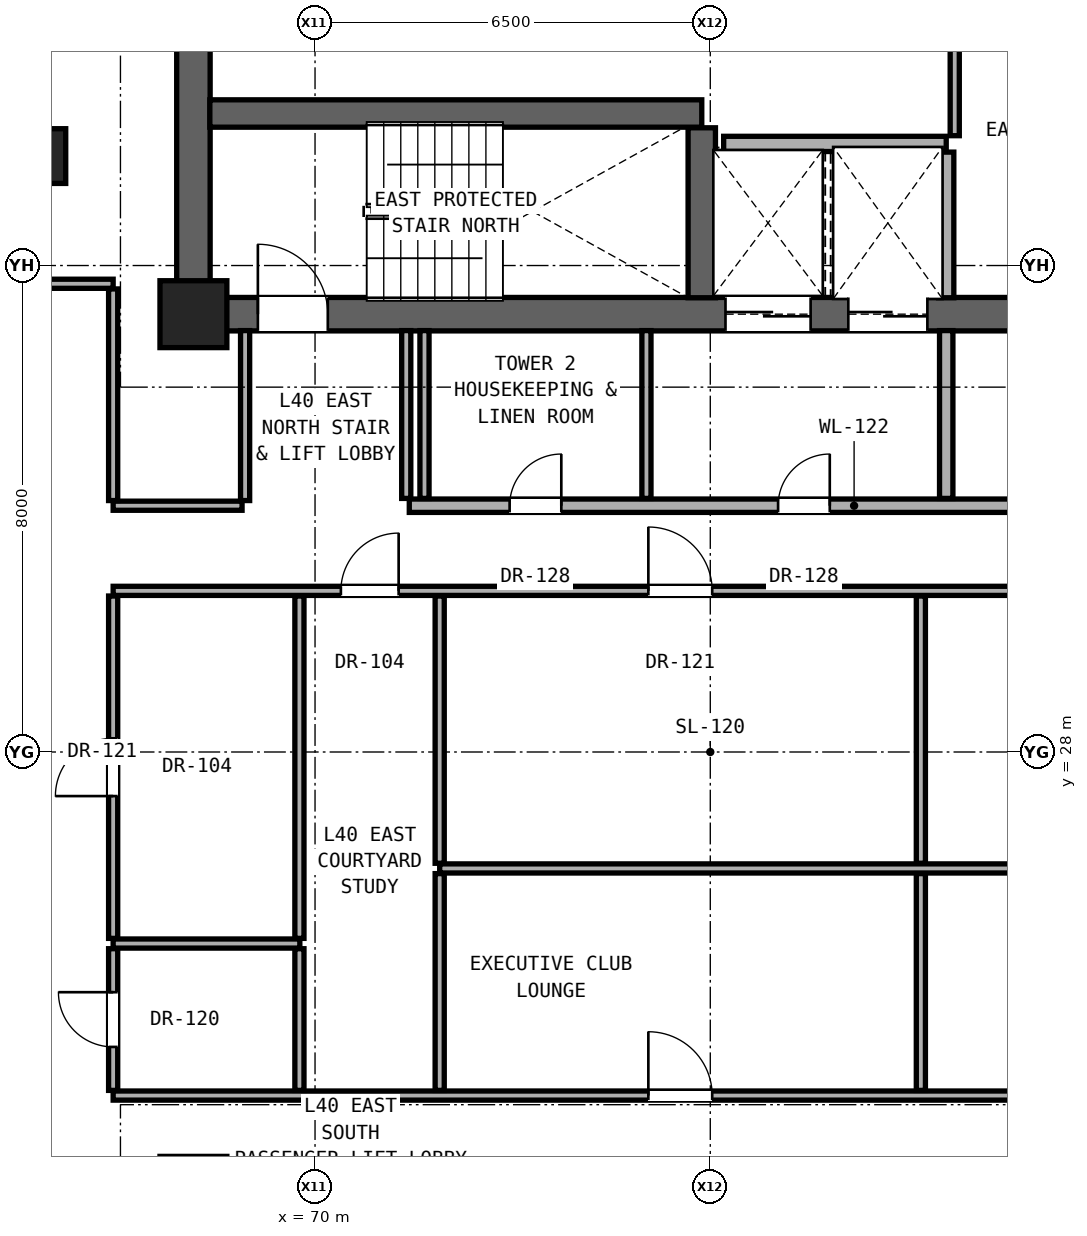
"""IFC4 building model, lengths in metres.
Left out: names, types, materials, properties, quantities, classifications, styles, units other than length and angle.
Written with IfcOpenShell. Run it as: python <this file> out.ifc"""

import sys

from ifc_helpers import new_model, si_unit, direction, frame, frame_2d, origin, origin_2d, place, context, subcontext, project, spatial, rectangle, extrude, element, fill, save


model = new_model("IFC4")
c1 = context("Model", 3, precision=1e-05, world=origin(), true_north=direction((0.0, 1.0)))
c2 = subcontext(c1, "Body", "Model", "MODEL_VIEW")
j1 = project(units=[si_unit("LENGTHUNIT", "METRE"), si_unit("PLANEANGLEUNIT", "RADIAN")], contexts=[c1])
p1 = place(None, origin())
s1 = spatial("IfcSite", under=j1, at=p1, CompositionType="ELEMENT")
p2 = place(p1, origin())
s2 = spatial("IfcBuilding", under=s1, at=p2, CompositionType="ELEMENT")
p3 = place(p2, frame((0.0, 0.0, 141.2)))
s3 = spatial("IfcBuildingStorey", under=s2, at=p3, CompositionType="ELEMENT", Elevation=141.2)
p4 = place(p3, frame((68.0, 35.2, 0.0), z_axis=(0.0, 0.0, 1.0), x_axis=(1.0, 0.0, 0.0)))
e1 = element("IfcColumn", 1, at=p4, inside=s3, PredefinedType="COLUMN", context=c2, shape_type="SweptSolid", body=[
    extrude(rectangle(XDim=1.1, YDim=1.1, at=origin_2d()), origin(), (0.0, 0.0, 1.0), 3.3),
])
p5 = place(p3, frame((65.6, 37.8, 0.0), z_axis=(0.0, 0.0, 1.0), x_axis=(1.0, 0.0, 0.0)))
e2 = element("IfcColumn", 2, at=p5, inside=s3, PredefinedType="PILASTER", context=c2, shape_type="SweptSolid", body=[
    extrude(rectangle(XDim=0.6, YDim=0.9, at=origin_2d()), origin(), (0.0, 0.0, 1.0), 3.3),
])
p6 = place(p3, frame((68.0, 35.2, 0.0), z_axis=(0.0, 0.0, 1.0), x_axis=(0.0, 1.0, 0.0)))
e3 = element("IfcWall", 3, at=p6, inside=s3, PredefinedType="SHEAR", context=c2, shape_type="SweptSolid", body=[
    extrude(rectangle(XDim=5.6, YDim=0.55, at=frame_2d((2.8, 0.0))), origin(), (0.0, 0.0, 1.0), 3.08),
])
p7 = place(p3, frame((68.0, 35.2, 0.0), z_axis=(0.0, 0.0, 1.0), x_axis=(1.0, 0.0, 0.0)))
e4 = element("IfcWall", 4, at=p7, inside=s3, PredefinedType="SHEAR", context=c2, shape_type="SweptSolid", body=[
    extrude(rectangle(XDim=17.0, YDim=0.55, at=frame_2d((8.5, 0.0))), origin(), (0.0, 0.0, 1.0), 3.08),
])
p8 = place(p7, frame((1.06, 0.0, 0.0)))
e5 = element("IfcOpeningElement", 5, at=p8, cuts=e4, PredefinedType="OPENING", context=c2, shape_type="SweptSolid", body=[
    extrude(rectangle(XDim=1.15, YDim=2.2, at=frame_2d((0.575, 1.1))), frame((0.0, 0.285, 0.0), z_axis=(0.0, -1.0, 0.0), x_axis=(1.0, 0.0, 0.0)), (0.0, 0.0, 1.0), 0.57),
])
p9 = place(p7, frame((8.75, 0.0, 0.0)))
e6 = element("IfcOpeningElement", 6, at=p9, cuts=e4, PredefinedType="OPENING", context=c2, shape_type="SweptSolid", body=[
    extrude(rectangle(XDim=1.4, YDim=2.35, at=frame_2d((0.7, 1.175))), frame((0.0, 0.285, 0.0), z_axis=(0.0, -1.0, 0.0), x_axis=(1.0, 0.0, 0.0)), (0.0, 0.0, 1.0), 0.57),
])
p10 = place(p7, frame((10.77, 0.0, 0.0)))
e7 = element("IfcOpeningElement", 7, at=p10, cuts=e4, PredefinedType="OPENING", context=c2, shape_type="SweptSolid", body=[
    extrude(rectangle(XDim=1.3, YDim=2.3, at=frame_2d((0.65, 1.15))), frame((0.0, 0.285, 0.0), z_axis=(0.0, -1.0, 0.0), x_axis=(1.0, 0.0, 0.0)), (0.0, 0.0, 1.0), 0.57),
])
p11 = place(p3, frame((66.68, 22.35, 0.0), z_axis=(0.0, 0.0, 1.0), x_axis=(1.0, 0.0, 0.0)))
e8 = element("IfcWall", 8, at=p11, inside=s3, PredefinedType="PARTITIONING", context=c2, shape_type="SweptSolid", body=[
    extrude(rectangle(XDim=19.5, YDim=0.15, at=frame_2d((9.75, 0.0))), origin(), (0.0, 0.0, 1.0), 2.216),
])
p12 = place(p11, frame((8.802, 0.0, 0.0)))
e9 = element("IfcOpeningElement", 9, at=p12, cuts=e8, PredefinedType="OPENING", context=c2, shape_type="SweptSolid", body=[
    extrude(rectangle(XDim=1.05, YDim=2.2, at=frame_2d((0.525, 1.1))), frame((0.0, 0.085, 0.0), z_axis=(0.0, -1.0, 0.0), x_axis=(1.0, 0.0, 0.0)), (0.0, 0.0, 1.0), 0.17),
])
p13 = place(p11, frame((15.846, 0.0, 0.0)))
e10 = element("IfcOpeningElement", 10, at=p13, cuts=e8, PredefinedType="OPENING", context=c2, shape_type="SweptSolid", body=[
    extrude(rectangle(XDim=1.05, YDim=2.2, at=frame_2d((0.525, 1.1))), frame((0.0, 0.085, 0.0), z_axis=(0.0, -1.0, 0.0), x_axis=(1.0, 0.0, 0.0)), (0.0, 0.0, 1.0), 0.17),
])
p14 = place(p3, frame((66.68, 24.85, 0.0), z_axis=(0.0, 0.0, 1.0), x_axis=(1.0, 0.0, 0.0)))
e11 = element("IfcWall", 11, at=p14, inside=s3, PredefinedType="PARTITIONING", context=c2, shape_type="SweptSolid", body=[
    extrude(rectangle(XDim=3.07, YDim=0.15, at=frame_2d((1.535, 0.0))), origin(), (0.0, 0.0, 1.0), 2.216),
])
p15 = place(p3, frame((72.05, 26.085, 0.0), z_axis=(0.0, 0.0, 1.0), x_axis=(1.0, 0.0, 0.0)))
e12 = element("IfcWall", 12, at=p15, inside=s3, PredefinedType="PARTITIONING", context=c2, shape_type="SweptSolid", body=[
    extrude(rectangle(XDim=14.13, YDim=0.15, at=frame_2d((7.065, 0.0))), origin(), (0.0, 0.0, 1.0), 2.216),
])
p16 = place(p3, frame((66.68, 30.65, 0.0), z_axis=(0.0, 0.0, 1.0), x_axis=(1.0, 0.0, 0.0)))
e13 = element("IfcWall", 13, at=p16, inside=s3, PredefinedType="PARTITIONING", context=c2, shape_type="SweptSolid", body=[
    extrude(rectangle(XDim=19.5, YDim=0.15, at=frame_2d((9.75, 0.0))), origin(), (0.0, 0.0, 1.0), 2.216),
])
p17 = place(p16, frame((3.745, 0.0, 0.0)))
e14 = element("IfcOpeningElement", 14, at=p17, cuts=e13, PredefinedType="OPENING", context=c2, shape_type="SweptSolid", body=[
    extrude(rectangle(XDim=0.95, YDim=2.15, at=frame_2d((0.475, 1.075))), frame((0.0, 0.085, 0.0), z_axis=(0.0, -1.0, 0.0), x_axis=(1.0, 0.0, 0.0)), (0.0, 0.0, 1.0), 0.17),
])
p18 = place(p16, frame((8.802, 0.0, 0.0)))
e15 = element("IfcOpeningElement", 15, at=p18, cuts=e13, PredefinedType="OPENING", context=c2, shape_type="SweptSolid", body=[
    extrude(rectangle(XDim=1.05, YDim=2.2, at=frame_2d((0.525, 1.1))), frame((0.0, 0.085, 0.0), z_axis=(0.0, -1.0, 0.0), x_axis=(1.0, 0.0, 0.0)), (0.0, 0.0, 1.0), 0.17),
])
p19 = place(p16, frame((15.846, 0.0, 0.0)))
e16 = element("IfcOpeningElement", 16, at=p19, cuts=e13, PredefinedType="OPENING", context=c2, shape_type="SweptSolid", body=[
    extrude(rectangle(XDim=1.05, YDim=2.2, at=frame_2d((0.525, 1.1))), frame((0.0, 0.085, 0.0), z_axis=(0.0, -1.0, 0.0), x_axis=(1.0, 0.0, 0.0)), (0.0, 0.0, 1.0), 0.17),
])
p20 = place(p3, frame((66.68, 32.05, 0.0), z_axis=(0.0, 0.0, 1.0), x_axis=(1.0, 0.0, 0.0)))
e17 = element("IfcWall", 17, at=p20, inside=s3, PredefinedType="PARTITIONING", context=c2, shape_type="SweptSolid", body=[
    extrude(rectangle(XDim=2.12, YDim=0.15, at=frame_2d((1.06, 0.0))), origin(), (0.0, 0.0, 1.0), 2.216),
])
p21 = place(p3, frame((71.55, 32.05, 0.0), z_axis=(0.0, 0.0, 1.0), x_axis=(1.0, 0.0, 0.0)))
e18 = element("IfcWall", 18, at=p21, inside=s3, PredefinedType="SOLIDWALL", context=c2, shape_type="SweptSolid", body=[
    extrude(rectangle(XDim=14.63, YDim=0.22, at=frame_2d((7.315, 0.0))), origin(), (0.0, 0.0, 1.0), 2.216),
])
p22 = place(p21, frame((6.065, 0.0, 0.0)))
e19 = element("IfcOpeningElement", 19, at=p22, cuts=e18, PredefinedType="OPENING", context=c2, shape_type="SweptSolid", body=[
    extrude(rectangle(XDim=0.85, YDim=2.01, at=frame_2d((0.425, 1.005))), frame((0.0, 0.12, 0.0), z_axis=(0.0, -1.0, 0.0), x_axis=(1.0, 0.0, 0.0)), (0.0, 0.0, 1.0), 0.24),
])
p23 = place(p21, frame((10.535, 0.0, 0.0)))
e20 = element("IfcOpeningElement", 20, at=p23, cuts=e18, PredefinedType="OPENING", context=c2, shape_type="SweptSolid", body=[
    extrude(rectangle(XDim=0.95, YDim=2.15, at=frame_2d((0.475, 1.075))), frame((0.0, 0.12, 0.0), z_axis=(0.0, -1.0, 0.0), x_axis=(1.0, 0.0, 0.0)), (0.0, 0.0, 1.0), 0.24),
])
p24 = place(p21, frame((1.65, 0.0, 0.0)))
e21 = element("IfcOpeningElement", 21, at=p24, cuts=e18, PredefinedType="OPENING", context=c2, shape_type="SweptSolid", body=[
    extrude(rectangle(XDim=0.85, YDim=2.01, at=frame_2d((0.425, 1.005))), frame((0.0, 0.12, 0.0), z_axis=(0.0, -1.0, 0.0), x_axis=(1.0, 0.0, 0.0)), (0.0, 0.0, 1.0), 0.24),
])
p25 = place(p3, frame((65.32, 35.7, 0.0), z_axis=(0.0, 0.0, 1.0), x_axis=(1.0, 0.0, 0.0)))
e22 = element("IfcWall", 22, at=p25, inside=s3, PredefinedType="PARTITIONING", context=c2, shape_type="SweptSolid", body=[
    extrude(rectangle(XDim=1.36, YDim=0.15, at=frame_2d((0.68, 0.0))), origin(), (0.0, 0.0, 1.0), 3.08),
])
p26 = place(p3, frame((76.72, 38.0, 0.0), z_axis=(0.0, 0.0, 1.0), x_axis=(1.0, 0.0, 0.0)))
e23 = element("IfcWall", 23, at=p26, inside=s3, PredefinedType="SOLIDWALL", context=c2, shape_type="SweptSolid", body=[
    extrude(rectangle(XDim=3.66, YDim=0.25, at=frame_2d((1.83, 0.0))), origin(), (0.0, 0.0, 1.0), 3.08),
])
p27 = place(p3, frame((68.27, 38.5, 0.0), z_axis=(0.0, 0.0, 1.0), x_axis=(1.0, 0.0, 0.0)))
e24 = element("IfcWall", 24, at=p27, inside=s3, PredefinedType="SHEAR", context=c2, shape_type="SweptSolid", body=[
    extrude(rectangle(XDim=8.09, YDim=0.45, at=frame_2d((4.045, 0.0))), origin(), (0.0, 0.0, 1.0), 3.08),
])
p28 = place(p3, frame((66.68, 22.435, 0.0), z_axis=(0.0, 0.0, 1.0), x_axis=(0.0, 1.0, 0.0)))
e25 = element("IfcWall", 25, at=p28, inside=s3, PredefinedType="PARTITIONING", context=c2, shape_type="SweptSolid", body=[
    extrude(rectangle(XDim=2.33, YDim=0.15, at=frame_2d((1.165, 0.0))), origin(), (0.0, 0.0, 1.0), 3.08),
])
p29 = place(p28, frame((0.715, 0.0, 0.0)))
e26 = element("IfcOpeningElement", 26, at=p29, cuts=e25, PredefinedType="OPENING", context=c2, shape_type="SweptSolid", body=[
    extrude(rectangle(XDim=0.9, YDim=2.1, at=frame_2d((0.45, 1.05))), frame((0.0, 0.085, 0.0), z_axis=(0.0, -1.0, 0.0), x_axis=(1.0, 0.0, 0.0)), (0.0, 0.0, 1.0), 0.17),
])
p30 = place(p3, frame((66.68, 24.935, 0.0), z_axis=(0.0, 0.0, 1.0), x_axis=(0.0, 1.0, 0.0)))
e27 = element("IfcWall", 27, at=p30, inside=s3, PredefinedType="PARTITIONING", context=c2, shape_type="SweptSolid", body=[
    extrude(rectangle(XDim=5.63, YDim=0.15, at=frame_2d((2.815, 0.0))), origin(), (0.0, 0.0, 1.0), 2.376),
])
p31 = place(p30, frame((2.34, 0.0, 0.0)))
e28 = element("IfcOpeningElement", 28, at=p31, cuts=e27, PredefinedType="OPENING", context=c2, shape_type="SweptSolid", body=[
    extrude(rectangle(XDim=0.95, YDim=2.15, at=frame_2d((0.475, 1.075))), frame((0.0, 0.085, 0.0), z_axis=(0.0, -1.0, 0.0), x_axis=(1.0, 0.0, 0.0)), (0.0, 0.0, 1.0), 0.17),
])
p32 = place(p3, frame((66.68, 32.135, 0.0), z_axis=(0.0, 0.0, 1.0), x_axis=(0.0, 1.0, 0.0)))
e29 = element("IfcWall", 29, at=p32, inside=s3, PredefinedType="PARTITIONING", context=c2, shape_type="SweptSolid", body=[
    extrude(rectangle(XDim=3.48, YDim=0.15, at=frame_2d((1.74, 0.0))), origin(), (0.0, 0.0, 1.0), 2.472),
])
p33 = place(p3, frame((68.85, 32.135, 0.0), z_axis=(0.0, 0.0, 1.0), x_axis=(0.0, 1.0, 0.0)))
e30 = element("IfcWall", 30, at=p33, inside=s3, PredefinedType="PARTITIONING", context=c2, shape_type="SweptSolid", body=[
    extrude(rectangle(XDim=2.795, YDim=0.15, at=frame_2d((1.397, 0.0))), origin(), (0.0, 0.0, 1.0), 3.08),
])
p34 = place(p3, frame((69.743, 22.435, 0.0), z_axis=(0.0, 0.0, 1.0), x_axis=(0.0, 1.0, 0.0)))
e31 = element("IfcWall", 31, at=p34, inside=s3, PredefinedType="PARTITIONING", context=c2, shape_type="SweptSolid", body=[
    extrude(rectangle(XDim=2.33, YDim=0.15, at=frame_2d((1.165, 0.0))), origin(), (0.0, 0.0, 1.0), 3.08),
])
p35 = place(p3, frame((69.743, 24.935, 0.0), z_axis=(0.0, 0.0, 1.0), x_axis=(0.0, 1.0, 0.0)))
e32 = element("IfcWall", 32, at=p35, inside=s3, PredefinedType="PARTITIONING", context=c2, shape_type="SweptSolid", body=[
    extrude(rectangle(XDim=5.63, YDim=0.15, at=frame_2d((2.815, 0.0))), origin(), (0.0, 0.0, 1.0), 2.216),
])
for number, where, z_axis, x_axis in (
    (33, (71.5, 32.17, 0.0), (0.0, 0.0, 1.0), (0.0, 1.0, 0.0)),
    (34, (71.8, 32.17, 0.0), (0.0, 0.0, 1.0), (0.0, 1.0, 0.0)),
):
    element("IfcWall", number, at=place(p3, frame(where, z_axis=z_axis, x_axis=x_axis)), inside=s3, PredefinedType="PARTITIONING", context=c2, shape_type="SweptSolid", body=[
        extrude(rectangle(XDim=2.76, YDim=0.15, at=frame_2d((1.38, 0.0))), origin(), (0.0, 0.0, 1.0), 3.08),
    ])
p36 = place(p3, frame((72.05, 22.435, 0.0), z_axis=(0.0, 0.0, 1.0), x_axis=(0.0, 1.0, 0.0)))
e35 = element("IfcWall", 35, at=p36, inside=s3, PredefinedType="PARTITIONING", context=c2, shape_type="SweptSolid", body=[
    extrude(rectangle(XDim=3.565, YDim=0.15, at=frame_2d((1.782, 0.0))), origin(), (0.0, 0.0, 1.0), 3.08),
])
p37 = place(p3, frame((72.05, 26.17, 0.0), z_axis=(0.0, 0.0, 1.0), x_axis=(0.0, 1.0, 0.0)))
e36 = element("IfcWall", 36, at=p37, inside=s3, PredefinedType="PARTITIONING", context=c2, shape_type="SweptSolid", body=[
    extrude(rectangle(XDim=4.395, YDim=0.15, at=frame_2d((2.198, 0.0))), origin(), (0.0, 0.0, 1.0), 2.216),
])
p38 = place(p3, frame((75.45, 32.17, 0.0), z_axis=(0.0, 0.0, 1.0), x_axis=(0.0, 1.0, 0.0)))
e37 = element("IfcWall", 37, at=p38, inside=s3, PredefinedType="PARTITIONING", context=c2, shape_type="SweptSolid", body=[
    extrude(rectangle(XDim=2.76, YDim=0.15, at=frame_2d((1.38, 0.0))), origin(), (0.0, 0.0, 1.0), 3.08),
])
p39 = place(p3, frame((76.36, 35.47, 0.0), z_axis=(0.0, 0.0, 1.0), x_axis=(0.0, 1.0, 0.0)))
e38 = element("IfcWall", 38, at=p39, inside=s3, PredefinedType="SHEAR", context=c2, shape_type="SweptSolid", body=[
    extrude(rectangle(XDim=2.795, YDim=0.45, at=frame_2d((1.397, 0.0))), origin(), (0.0, 0.0, 1.0), 3.08),
])
p40 = place(p3, frame((79.963, 22.435, 0.0), z_axis=(0.0, 0.0, 1.0), x_axis=(0.0, 1.0, 0.0)))
e39 = element("IfcWall", 39, at=p40, inside=s3, PredefinedType="PARTITIONING", context=c2, shape_type="SweptSolid", body=[
    extrude(rectangle(XDim=3.565, YDim=0.15, at=frame_2d((1.782, 0.0))), origin(), (0.0, 0.0, 1.0), 3.08),
])
p41 = place(p3, frame((79.963, 26.17, 0.0), z_axis=(0.0, 0.0, 1.0), x_axis=(0.0, 1.0, 0.0)))
e40 = element("IfcWall", 40, at=p41, inside=s3, PredefinedType="PARTITIONING", context=c2, shape_type="SweptSolid", body=[
    extrude(rectangle(XDim=4.395, YDim=0.15, at=frame_2d((2.198, 0.0))), origin(), (0.0, 0.0, 1.0), 2.216),
])
p42 = place(p3, frame((80.38, 32.17, 0.0), z_axis=(0.0, 0.0, 1.0), x_axis=(0.0, 1.0, 0.0)))
e41 = element("IfcWall", 41, at=p42, inside=s3, PredefinedType="SOLIDWALL", context=c2, shape_type="SweptSolid", body=[
    extrude(rectangle(XDim=2.76, YDim=0.22, at=frame_2d((1.38, 0.0))), origin(), (0.0, 0.0, 1.0), 3.08),
])
p43 = place(p3, frame((80.38, 35.47, 0.0), z_axis=(0.0, 0.0, 1.0), x_axis=(0.0, 1.0, 0.0)))
e42 = element("IfcWall", 42, at=p43, inside=s3, PredefinedType="SOLIDWALL", context=c2, shape_type="SweptSolid", body=[
    extrude(rectangle(XDim=2.395, YDim=0.25, at=frame_2d((1.198, 0.0))), origin(), (0.0, 0.0, 1.0), 3.08),
])
p44 = place(p3, frame((80.52, 38.135, 0.0), z_axis=(0.0, 0.0, 1.0), x_axis=(0.0, 1.0, 0.0)))
e43 = element("IfcWall", 43, at=p44, inside=s3, PredefinedType="PARTITIONING", context=c2, shape_type="SweptSolid", body=[
    extrude(rectangle(XDim=2.315, YDim=0.15, at=frame_2d((1.157, 0.0))), origin(), (0.0, 0.0, 1.0), 3.08),
])
p45 = place(p8, origin())
e44 = element("IfcDoor", 44, at=p45, inside=s3, OperationType="SINGLE_SWING_LEFT", PredefinedType="DOOR", context=c2, shape_type="SweptSolid", body=[
    extrude(rectangle(XDim=1.15, YDim=2.2, at=frame_2d((0.575, 1.1))), frame((0.0, 0.025, 0.0), z_axis=(0.0, -1.0, 0.0), x_axis=(1.0, 0.0, 0.0)), (0.0, 0.0, 1.0), 0.05),
])
fill(e5, e44)
p46 = place(p22, origin())
e45 = element("IfcDoor", 45, at=p46, inside=s3, OperationType="SINGLE_SWING_RIGHT", PredefinedType="DOOR", context=c2, shape_type="SweptSolid", body=[
    extrude(rectangle(XDim=0.85, YDim=2.01, at=frame_2d((0.425, 1.005))), frame((0.0, 0.025, 0.0), z_axis=(0.0, -1.0, 0.0), x_axis=(1.0, 0.0, 0.0)), (0.0, 0.0, 1.0), 0.05),
])
fill(e19, e45)
p47 = place(p24, origin())
e46 = element("IfcDoor", 46, at=p47, inside=s3, OperationType="SINGLE_SWING_RIGHT", PredefinedType="DOOR", context=c2, shape_type="SweptSolid", body=[
    extrude(rectangle(XDim=0.85, YDim=2.01, at=frame_2d((0.425, 1.005))), frame((0.0, 0.025, 0.0), z_axis=(0.0, -1.0, 0.0), x_axis=(1.0, 0.0, 0.0)), (0.0, 0.0, 1.0), 0.05),
])
fill(e21, e46)
p48 = place(p29, origin())
e47 = element("IfcDoor", 47, at=p48, inside=s3, OperationType="SINGLE_SWING_RIGHT", PredefinedType="DOOR", context=c2, shape_type="SweptSolid", body=[
    extrude(rectangle(XDim=0.9, YDim=2.1, at=frame_2d((0.45, 1.05))), frame((0.0, 0.025, 0.0), z_axis=(0.0, -1.0, 0.0), x_axis=(1.0, 0.0, 0.0)), (0.0, 0.0, 1.0), 0.05),
])
fill(e26, e47)
p49 = place(p31, origin())
e48 = element("IfcDoor", 48, at=p49, inside=s3, OperationType="SINGLE_SWING_LEFT", PredefinedType="DOOR", context=c2, shape_type="SweptSolid", body=[
    extrude(rectangle(XDim=0.95, YDim=2.15, at=frame_2d((0.475, 1.075))), frame((0.0, 0.025, 0.0), z_axis=(0.0, -1.0, 0.0), x_axis=(1.0, 0.0, 0.0)), (0.0, 0.0, 1.0), 0.05),
])
fill(e28, e48)
p50 = place(p17, origin())
e49 = element("IfcDoor", 49, at=p50, inside=s3, OperationType="SINGLE_SWING_RIGHT", PredefinedType="DOOR", context=c2, shape_type="SweptSolid", body=[
    extrude(rectangle(XDim=0.95, YDim=2.15, at=frame_2d((0.475, 1.075))), frame((0.0, 0.025, 0.0), z_axis=(0.0, -1.0, 0.0), x_axis=(1.0, 0.0, 0.0)), (0.0, 0.0, 1.0), 0.05),
])
fill(e14, e49)
p51 = place(p12, origin())
e50 = element("IfcDoor", 50, at=p51, inside=s3, OperationType="SINGLE_SWING_LEFT", PredefinedType="DOOR", context=c2, shape_type="SweptSolid", body=[
    extrude(rectangle(XDim=1.05, YDim=2.2, at=frame_2d((0.525, 1.1))), frame((0.0, 0.025, 0.0), z_axis=(0.0, -1.0, 0.0), x_axis=(1.0, 0.0, 0.0)), (0.0, 0.0, 1.0), 0.05),
])
fill(e9, e50)
p52 = place(p18, origin())
e51 = element("IfcDoor", 51, at=p52, inside=s3, OperationType="SINGLE_SWING_LEFT", PredefinedType="DOOR", context=c2, shape_type="SweptSolid", body=[
    extrude(rectangle(XDim=1.05, YDim=2.2, at=frame_2d((0.525, 1.1))), frame((0.0, 0.025, 0.0), z_axis=(0.0, -1.0, 0.0), x_axis=(1.0, 0.0, 0.0)), (0.0, 0.0, 1.0), 0.05),
])
fill(e15, e51)
p53 = place(p9, origin())
e52 = element("IfcDoor", 52, at=p53, inside=s3, OperationType="DOUBLE_DOOR_SLIDING", PredefinedType="DOOR", context=c2, shape_type="SweptSolid", body=[
    extrude(rectangle(XDim=1.4, YDim=2.35, at=frame_2d((0.7, 1.175))), frame((0.0, 0.025, 0.0), z_axis=(0.0, -1.0, 0.0), x_axis=(1.0, 0.0, 0.0)), (0.0, 0.0, 1.0), 0.05),
])
fill(e6, e52)
p54 = place(p10, origin())
e53 = element("IfcDoor", 53, at=p54, inside=s3, OperationType="DOUBLE_DOOR_SLIDING", PredefinedType="DOOR", context=c2, shape_type="SweptSolid", body=[
    extrude(rectangle(XDim=1.3, YDim=2.3, at=frame_2d((0.65, 1.15))), frame((0.0, 0.025, 0.0), z_axis=(0.0, -1.0, 0.0), x_axis=(1.0, 0.0, 0.0)), (0.0, 0.0, 1.0), 0.05),
])
fill(e7, e53)
save(model, sys.argv[1])
